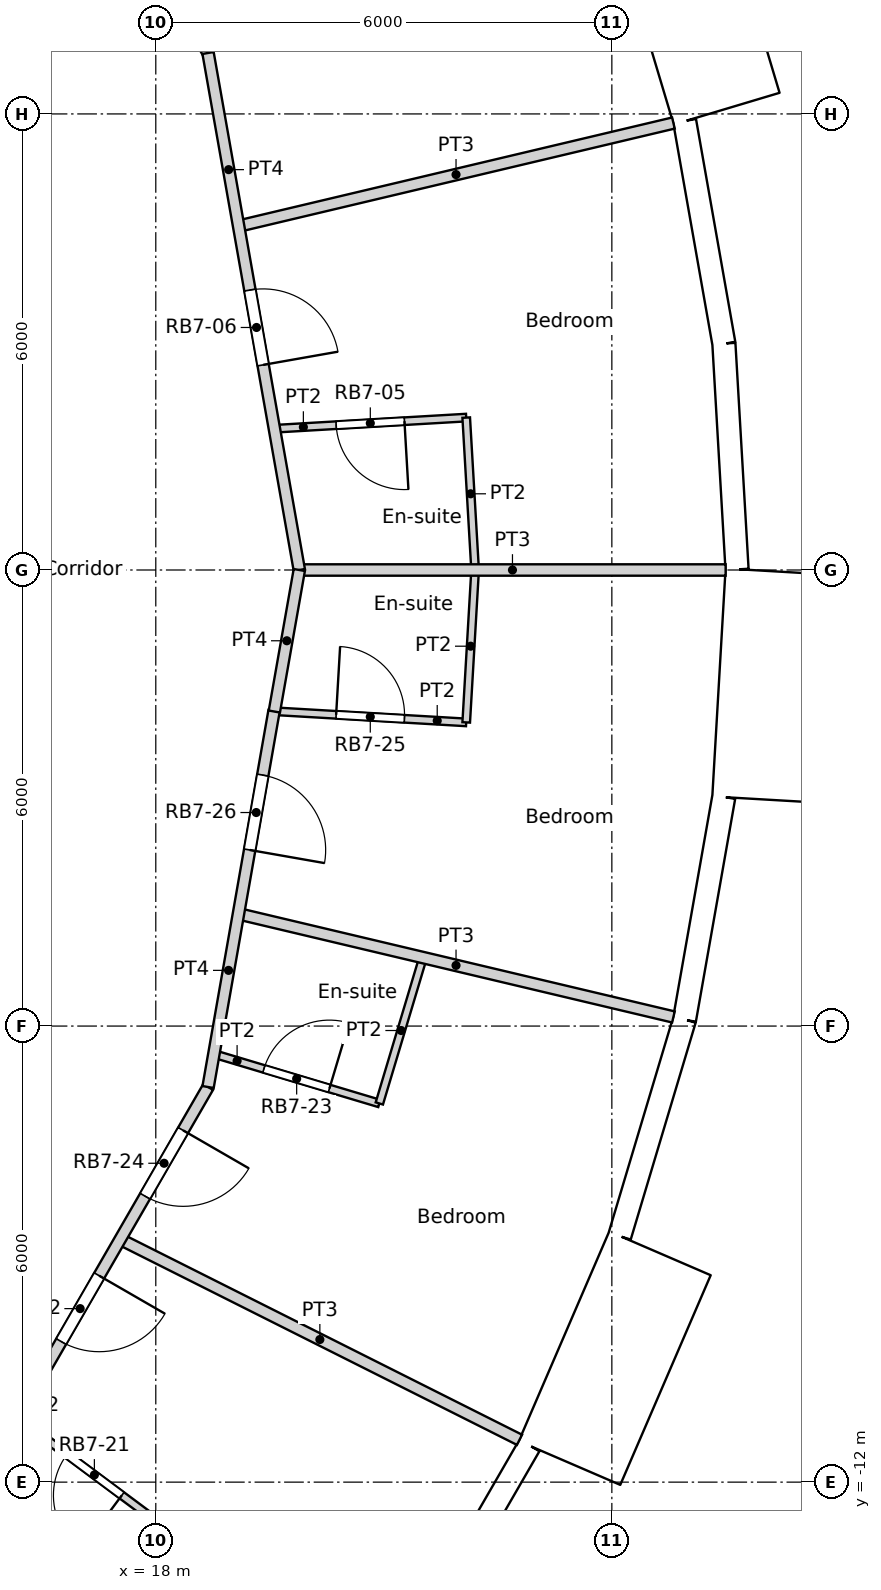
"""IFC4 building model, lengths in metres.
Left out: names, types, materials, properties, quantities, classifications, styles, units other than length and angle.
Written with IfcOpenShell. Run it as: python <this file> out.ifc"""

import sys

from ifc_helpers import new_model, si_unit, direction, frame, frame_2d, origin, origin_2d, place, context, subcontext, project, spatial, rectangle, circle, extrude, element, fill, save


model = new_model("IFC4")
c1 = context("Model", 3, precision=1e-05, world=origin(), true_north=direction((0.0, 1.0)))
c2 = subcontext(c1, "Body", "Model", "MODEL_VIEW")
j1 = project(units=[si_unit("LENGTHUNIT", "METRE"), si_unit("PLANEANGLEUNIT", "RADIAN")], contexts=[c1])
p1 = place(None, origin())
s1 = spatial("IfcSite", under=j1, at=p1, CompositionType="ELEMENT")
p2 = place(p1, origin())
s2 = spatial("IfcBuilding", under=s1, at=p2, CompositionType="ELEMENT")
p3 = place(p2, frame((0.0, 0.0, 190.8)))
s3 = spatial("IfcBuildingStorey", under=s2, at=p3, CompositionType="ELEMENT", Elevation=190.8)
for number, where, z_axis, x_axis in (
    (1, (24.548, 0.0, 0.0), (0.0, 0.0, 1.0), (1.0, 0.0, 0.0)),
    (2, (23.886, 5.661, 0.0), (0.0, 0.0, 1.0), (1.0, 0.0, 0.0)),
    (3, (21.937, -11.017, 0.0), (0.0, 0.0, 1.0), (1.0, 0.0, 0.0)),
    (4, (23.886, -5.661, 0.0), (0.0, 0.0, 1.0), (1.0, 0.0, 0.0)),
):
    element("IfcColumn", number, at=place(p3, frame(where, z_axis=z_axis, x_axis=x_axis)), inside=s3, PredefinedType="COLUMN", context=c2, shape_type="SweptSolid", body=[
        extrude(circle(Radius=0.6, at=origin_2d()), origin(), (0.0, 0.0, 1.0), 3.6),
    ])
for number, where, z_axis, x_axis in (
    (5, (18.822, 0.0, 0.0), (0.0, 0.0, 1.0), (1.0, 0.0, 0.0)),
    (6, (17.986, 5.548, 0.0), (0.0, 0.0, 1.0), (1.0, 0.0, 0.0)),
    (7, (17.986, -5.548, 0.0), (0.0, 0.0, 1.0), (1.0, 0.0, 0.0)),
):
    element("IfcColumn", number, at=place(p3, frame(where, z_axis=z_axis, x_axis=x_axis)), inside=s3, PredefinedType="COLUMN", context=c2, shape_type="SweptSolid", body=[
        extrude(circle(Radius=0.65, at=origin_2d()), origin(), (0.0, 0.0, 1.0), 3.6),
    ])
p4 = place(p3, frame((25.647, 0.01, 0.0), z_axis=(0.0, 0.0, 1.0), x_axis=(-0.058139540521, 0.998308466271, 0.0)))
e8 = element("IfcWall", 8, at=p4, inside=s3, PredefinedType="SOLIDWALL", context=c2, shape_type="SweptSolid", body=[
    extrude(rectangle(XDim=2.973, YDim=0.3, at=frame_2d((1.487, 0.0))), origin(), (0.0, 0.0, 1.0), 2.8),
])
p5 = place(p4, frame((1.486, 0.0, 1.55)))
e9 = element("IfcOpeningElement", 9, at=p5, cuts=e8, PredefinedType="OPENING", context=c2, shape_type="SweptSolid", body=[
    extrude(circle(Radius=0.9, at=origin_2d()), frame((0.0, 0.16, 0.0), z_axis=(0.0, -1.0, 0.0), x_axis=(1.0, 0.0, 0.0)), (0.0, 0.0, 1.0), 0.32),
])
p6 = place(p3, frame((25.474, 2.978, 0.0), z_axis=(0.0, 0.0, 1.0), x_axis=(-0.173686952598, 0.984800915159, 0.0)))
e10 = element("IfcWall", 10, at=p6, inside=s3, PredefinedType="SOLIDWALL", context=c2, shape_type="SweptSolid", body=[
    extrude(rectangle(XDim=2.973, YDim=0.3, at=frame_2d((1.486, 0.0))), origin(), (0.0, 0.0, 1.0), 3.3),
])
p7 = place(p6, frame((1.486, 0.0, 1.55)))
e11 = element("IfcOpeningElement", 11, at=p7, cuts=e10, PredefinedType="OPENING", context=c2, shape_type="SweptSolid", body=[
    extrude(circle(Radius=0.9, at=origin_2d()), frame((0.0, 0.16, 0.0), z_axis=(0.0, -1.0, 0.0), x_axis=(1.0, 0.0, 0.0)), (0.0, 0.0, 1.0), 0.32),
])
p8 = place(p3, frame((25.51, 6.071, -0.3), z_axis=(0.0, 0.0, 1.0), x_axis=(-0.286780420304, 0.957996341606, 0.0)))
e12 = element("IfcWall", 12, at=p8, inside=s3, PredefinedType="ELEMENTEDWALL", context=c2, shape_type="SweptSolid", body=[
    extrude(rectangle(XDim=3.0, YDim=1.45, at=frame_2d((1.5, 0.0))), origin(), (0.0, 0.0, 1.0), 3.6),
])
p9 = place(p8, frame((1.5, 0.0, 1.85)))
e13 = element("IfcOpeningElement", 13, at=p9, cuts=e12, PredefinedType="OPENING", context=c2, shape_type="SweptSolid", body=[
    extrude(circle(Radius=0.9, at=origin_2d()), frame((0.0, 0.735, 0.0), z_axis=(0.0, -1.0, 0.0), x_axis=(1.0, 0.0, 0.0)), (0.0, 0.0, 1.0), 1.47),
])
p10 = place(p3, frame((21.428, -14.094, 0.0), z_axis=(0.0, 0.0, 1.0), x_axis=(0.499954672104, 0.866051572276, 0.0)))
e14 = element("IfcWall", 14, at=p10, inside=s3, PredefinedType="SOLIDWALL", context=c2, shape_type="SweptSolid", body=[
    extrude(rectangle(XDim=2.973, YDim=0.3, at=frame_2d((1.486, 0.0))), origin(), (0.0, 0.0, 1.0), 3.3),
])
p11 = place(p10, frame((1.486, 0.0, 1.55)))
e15 = element("IfcOpeningElement", 15, at=p11, cuts=e14, PredefinedType="OPENING", context=c2, shape_type="SweptSolid", body=[
    extrude(circle(Radius=0.9, at=origin_2d()), frame((0.0, 0.16, 0.0), z_axis=(0.0, -1.0, 0.0), x_axis=(1.0, 0.0, 0.0)), (0.0, 0.0, 1.0), 0.32),
])
p12 = place(p3, frame((23.444, -11.746, -0.3), z_axis=(0.0, 0.0, 1.0), x_axis=(0.396079003245, 0.918216435917, 0.0)))
e16 = element("IfcWall", 16, at=p12, inside=s3, PredefinedType="ELEMENTEDWALL", context=c2, shape_type="SweptSolid", body=[
    extrude(rectangle(XDim=3.0, YDim=1.45, at=frame_2d((1.5, 0.0))), origin(), (0.0, 0.0, 1.0), 3.6),
])
p13 = place(p12, frame((1.5, 0.0, 1.85)))
e17 = element("IfcOpeningElement", 17, at=p13, cuts=e16, PredefinedType="OPENING", context=c2, shape_type="SweptSolid", body=[
    extrude(circle(Radius=0.9, at=origin_2d()), frame((0.0, 0.735, 0.0), z_axis=(0.0, -1.0, 0.0), x_axis=(1.0, 0.0, 0.0)), (0.0, 0.0, 1.0), 1.47),
])
p14 = place(p3, frame((24.104, -8.763, 0.0), z_axis=(0.0, 0.0, 1.0), x_axis=(0.286782750849, 0.957995643944, 0.0)))
e18 = element("IfcWall", 18, at=p14, inside=s3, PredefinedType="SOLIDWALL", context=c2, shape_type="SweptSolid", body=[
    extrude(rectangle(XDim=2.973, YDim=0.3, at=frame_2d((1.486, 0.0))), origin(), (0.0, 0.0, 1.0), 2.8),
])
p15 = place(p14, frame((1.486, 0.0, 1.55)))
e19 = element("IfcOpeningElement", 19, at=p15, cuts=e18, PredefinedType="OPENING", context=c2, shape_type="SweptSolid", body=[
    extrude(circle(Radius=0.9, at=origin_2d()), frame((0.0, 0.16, 0.0), z_axis=(0.0, -1.0, 0.0), x_axis=(1.0, 0.0, 0.0)), (0.0, 0.0, 1.0), 0.32),
])
p16 = place(p3, frame((24.956, -5.915, 0.0), z_axis=(0.0, 0.0, 1.0), x_axis=(0.173686952598, 0.984800915159, 0.0)))
e20 = element("IfcWall", 20, at=p16, inside=s3, PredefinedType="SOLIDWALL", context=c2, shape_type="SweptSolid", body=[
    extrude(rectangle(XDim=2.973, YDim=0.3, at=frame_2d((1.486, 0.0))), origin(), (0.0, 0.0, 1.0), 3.3),
])
p17 = place(p16, frame((1.486, 0.0, 1.55)))
e21 = element("IfcOpeningElement", 21, at=p17, cuts=e20, PredefinedType="OPENING", context=c2, shape_type="SweptSolid", body=[
    extrude(circle(Radius=0.9, at=origin_2d()), frame((0.0, 0.16, 0.0), z_axis=(0.0, -1.0, 0.0), x_axis=(1.0, 0.0, 0.0)), (0.0, 0.0, 1.0), 0.32),
])
p18 = place(p3, frame((26.048, -3.02, -0.3), z_axis=(0.0, 0.0, 1.0), x_axis=(0.058106596105, 0.998310384344, 0.0)))
e22 = element("IfcWall", 22, at=p18, inside=s3, PredefinedType="ELEMENTEDWALL", context=c2, shape_type="SweptSolid", body=[
    extrude(rectangle(XDim=3.0, YDim=1.45, at=frame_2d((1.5, 0.0))), origin(), (0.0, 0.0, 1.0), 3.6),
])
p19 = place(p18, frame((1.5, 0.0, 1.85)))
e23 = element("IfcOpeningElement", 23, at=p19, cuts=e22, PredefinedType="OPENING", context=c2, shape_type="SweptSolid", body=[
    extrude(circle(Radius=0.9, at=origin_2d()), frame((0.0, 0.735, 0.0), z_axis=(0.0, -1.0, 0.0), x_axis=(1.0, 0.0, 0.0)), (0.0, 0.0, 1.0), 1.47),
])
p20 = place(p3, frame((18.688, 6.802, 0.0), z_axis=(0.0, 0.0, 1.0), x_axis=(0.173831710537, -0.984775373581, 0.0)))
e24 = element("IfcWall", 24, at=p20, inside=s3, PredefinedType="PARTITIONING", context=c2, shape_type="SweptSolid", body=[
    extrude(rectangle(XDim=6.907, YDim=0.15, at=frame_2d((3.454, 0.0))), origin(), (0.0, 0.0, 1.0), 3.3),
])
p21 = place(p20, frame((3.167, 0.0, 0.0)))
e25 = element("IfcOpeningElement", 25, at=p21, cuts=e24, PredefinedType="OPENING", context=c2, shape_type="SweptSolid", body=[
    extrude(rectangle(XDim=1.0, YDim=2.1, at=frame_2d((0.5, 1.05))), frame((0.0, 0.075, 0.0), z_axis=(0.0, -1.0, 0.0), x_axis=(1.0, 0.0, 0.0)), (0.0, 0.0, 1.0), 0.15),
])
p22 = place(p3, frame((15.235, 12.784, 0.0), z_axis=(0.0, 0.0, 1.0), x_axis=(0.499914202267, -0.866074933462, 0.0)))
e26 = element("IfcWall", 26, at=p22, inside=s3, PredefinedType="PARTITIONING", context=c2, shape_type="SweptSolid", body=[
    extrude(rectangle(XDim=6.907, YDim=0.15, at=frame_2d((3.454, 0.0))), origin(), (0.0, 0.0, 1.0), 3.3),
])
p23 = place(p22, frame((3.004, 0.0, 0.0)))
e27 = element("IfcOpeningElement", 27, at=p23, cuts=e26, PredefinedType="OPENING", context=c2, shape_type="SweptSolid", body=[
    extrude(rectangle(XDim=1.8, YDim=2.1, at=frame_2d((0.9, 1.05))), frame((0.0, 0.075, 0.0), z_axis=(0.0, -1.0, 0.0), x_axis=(1.0, 0.0, 0.0)), (0.0, 0.0, 1.0), 0.15),
])
p24 = place(p3, frame((15.235, -12.784, 0.0), z_axis=(0.0, 0.0, 1.0), x_axis=(0.499982531118, 0.866035489213, 0.0)))
e28 = element("IfcWall", 28, at=p24, inside=s3, PredefinedType="PARTITIONING", context=c2, shape_type="SweptSolid", body=[
    extrude(rectangle(XDim=6.907, YDim=0.15, at=frame_2d((3.454, 0.0))), origin(), (0.0, 0.0, 1.0), 3.3),
])
p25 = place(p24, frame((3.041, 0.0, 0.0)))
e29 = element("IfcOpeningElement", 29, at=p25, cuts=e28, PredefinedType="OPENING", context=c2, shape_type="SweptSolid", body=[
    extrude(rectangle(XDim=1.0, YDim=2.1, at=frame_2d((0.5, 1.05))), frame((0.0, 0.075, 0.0), z_axis=(0.0, -1.0, 0.0), x_axis=(1.0, 0.0, 0.0)), (0.0, 0.0, 1.0), 0.15),
])
p26 = place(p24, frame((5.249, 0.0, 0.0)))
e30 = element("IfcOpeningElement", 30, at=p26, cuts=e28, PredefinedType="OPENING", context=c2, shape_type="SweptSolid", body=[
    extrude(rectangle(XDim=1.0, YDim=2.1, at=frame_2d((0.5, 1.05))), frame((0.0, 0.075, 0.0), z_axis=(0.0, -1.0, 0.0), x_axis=(1.0, 0.0, 0.0)), (0.0, 0.0, 1.0), 0.15),
])
p27 = place(p3, frame((18.688, -6.802, 0.0), z_axis=(0.0, 0.0, 1.0), x_axis=(0.172737452508, 0.9849679043, 0.0)))
e31 = element("IfcWall", 31, at=p27, inside=s3, PredefinedType="PARTITIONING", context=c2, shape_type="SweptSolid", body=[
    extrude(rectangle(XDim=5.024, YDim=0.15, at=frame_2d((2.512, 0.0))), origin(), (0.0, 0.0, 1.0), 3.3),
])
p28 = place(p27, frame((3.167, 0.0, 0.0)))
e32 = element("IfcOpeningElement", 32, at=p28, cuts=e31, PredefinedType="OPENING", context=c2, shape_type="SweptSolid", body=[
    extrude(rectangle(XDim=1.0, YDim=2.1, at=frame_2d((0.5, 1.05))), frame((0.0, 0.075, 0.0), z_axis=(0.0, -1.0, 0.0), x_axis=(1.0, 0.0, 0.0)), (0.0, 0.0, 1.0), 0.15),
])
p29 = place(p3, frame((19.56, -1.862, 0.0), z_axis=(0.0, 0.0, 1.0), x_axis=(0.173417007661, 0.984848486547, 0.0)))
e33 = element("IfcWall", 33, at=p29, inside=s3, PredefinedType="PARTITIONING", context=c2, shape_type="SweptSolid", body=[
    extrude(rectangle(XDim=1.891, YDim=0.15, at=frame_2d((0.945, 0.0))), origin(), (0.0, 0.0, 1.0), 3.3),
])
p30 = place(p3, frame((22.084, 2.005, 0.0), z_axis=(0.0, 0.0, 1.0), x_axis=(0.058230299749, -0.998303176491, 0.0)))
e34 = element("IfcWall", 34, at=p30, inside=s3, PredefinedType="PARTITIONING", context=c2, shape_type="SweptSolid", body=[
    extrude(rectangle(XDim=2.008, YDim=0.1, at=frame_2d((1.004, 0.0))), origin(), (0.0, 0.0, 1.0), 3.3),
])
p31 = place(p3, frame((19.56, 1.858, 0.0), z_axis=(0.0, 0.0, 1.0), x_axis=(0.998308830473, 0.05813328651, 0.0)))
e35 = element("IfcWall", 35, at=p31, inside=s3, PredefinedType="PARTITIONING", context=c2, shape_type="SweptSolid", body=[
    extrude(rectangle(XDim=2.528, YDim=0.1, at=frame_2d((1.264, 0.0))), origin(), (0.0, 0.0, 1.0), 3.3),
])
p32 = place(p31, frame((0.814, 0.0, 0.0)))
e36 = element("IfcOpeningElement", 36, at=p32, cuts=e35, PredefinedType="OPENING", context=c2, shape_type="SweptSolid", body=[
    extrude(rectangle(XDim=0.9, YDim=2.04, at=frame_2d((0.45, 1.02))), frame((0.0, 0.05, 0.0), z_axis=(0.0, -1.0, 0.0), x_axis=(1.0, 0.0, 0.0)), (0.0, 0.0, 1.0), 0.1),
])
p33 = place(p3, frame((19.09, 4.524, 0.0), z_axis=(0.0, 0.0, 1.0), x_axis=(0.973033452951, 0.230664040193, 0.0)))
e37 = element("IfcWall", 37, at=p33, inside=s3, PredefinedType="PARTITIONING", context=c2, shape_type="SweptSolid", body=[
    extrude(rectangle(XDim=5.878, YDim=0.15, at=frame_2d((2.939, 0.0))), origin(), (0.0, 0.0, 1.0), 3.3),
])
p34 = place(p3, frame((19.888, 0.0, 0.0), z_axis=(0.0, 0.0, 1.0), x_axis=(1.0, 0.0, 0.0)))
e38 = element("IfcWall", 38, at=p34, inside=s3, PredefinedType="PARTITIONING", context=c2, shape_type="SweptSolid", body=[
    extrude(rectangle(XDim=5.609, YDim=0.15, at=frame_2d((2.805, 0.0))), origin(), (0.0, 0.0, 1.0), 3.3),
])
p35 = place(p3, frame((16.178, -11.15, 0.0), z_axis=(0.0, 0.0, 1.0), x_axis=(0.8020923136, -0.597200067367, 0.0)))
e39 = element("IfcWall", 39, at=p35, inside=s3, PredefinedType="PARTITIONING", context=c2, shape_type="SweptSolid", body=[
    extrude(rectangle(XDim=2.529, YDim=0.1, at=frame_2d((1.264, 0.0))), origin(), (0.0, 0.0, 1.0), 3.3),
])
p36 = place(p35, frame((0.814, 0.0, 0.0)))
e40 = element("IfcOpeningElement", 40, at=p36, cuts=e39, PredefinedType="OPENING", context=c2, shape_type="SweptSolid", body=[
    extrude(rectangle(XDim=0.9, YDim=2.04, at=frame_2d((0.45, 1.02))), frame((0.0, 0.05, 0.0), z_axis=(0.0, -1.0, 0.0), x_axis=(1.0, 0.0, 0.0)), (0.0, 0.0, 1.0), 0.1),
])
p37 = place(p3, frame((17.532, -8.805, 0.0), z_axis=(0.0, 0.0, 1.0), x_axis=(0.893628331628, -0.448807759415, 0.0)))
e41 = element("IfcWall", 41, at=p37, inside=s3, PredefinedType="PARTITIONING", context=c2, shape_type="SweptSolid", body=[
    extrude(rectangle(XDim=5.878, YDim=0.15, at=frame_2d((2.939, 0.0))), origin(), (0.0, 0.0, 1.0), 3.3),
])
p38 = place(p3, frame((18.765, -6.367, 0.0), z_axis=(0.0, 0.0, 1.0), x_axis=(0.958030169919, -0.286667391807, 0.0)))
e42 = element("IfcWall", 42, at=p38, inside=s3, PredefinedType="PARTITIONING", context=c2, shape_type="SweptSolid", body=[
    extrude(rectangle(XDim=2.271, YDim=0.1, at=frame_2d((1.136, 0.0))), origin(), (0.0, 0.0, 1.0), 3.3),
])
p39 = place(p38, frame((0.686, 0.0, 0.0)))
e43 = element("IfcOpeningElement", 43, at=p39, cuts=e42, PredefinedType="OPENING", context=c2, shape_type="SweptSolid", body=[
    extrude(rectangle(XDim=0.9, YDim=2.04, at=frame_2d((0.45, 1.02))), frame((0.0, 0.05, 0.0), z_axis=(0.0, -1.0, 0.0), x_axis=(1.0, 0.0, 0.0)), (0.0, 0.0, 1.0), 0.1),
])
p40 = place(p3, frame((20.941, -7.018, 0.0), z_axis=(0.0, 0.0, 1.0), x_axis=(0.287124264191, 0.957893343182, 0.0)))
e44 = element("IfcWall", 44, at=p40, inside=s3, PredefinedType="PARTITIONING", context=c2, shape_type="SweptSolid", body=[
    extrude(rectangle(XDim=2.003, YDim=0.1, at=frame_2d((1.002, 0.0))), origin(), (0.0, 0.0, 1.0), 3.3),
])
p41 = place(p3, frame((19.09, -4.524, 0.0), z_axis=(0.0, 0.0, 1.0), x_axis=(0.973024130834, -0.230703361082, 0.0)))
e45 = element("IfcWall", 45, at=p41, inside=s3, PredefinedType="PARTITIONING", context=c2, shape_type="SweptSolid", body=[
    extrude(rectangle(XDim=5.879, YDim=0.15, at=frame_2d((2.939, 0.0))), origin(), (0.0, 0.0, 1.0), 3.3),
])
p42 = place(p3, frame((19.56, -1.858, 0.0), z_axis=(0.0, 0.0, 1.0), x_axis=(0.998308830473, -0.05813328651, 0.0)))
e46 = element("IfcWall", 46, at=p42, inside=s3, PredefinedType="PARTITIONING", context=c2, shape_type="SweptSolid", body=[
    extrude(rectangle(XDim=2.528, YDim=0.1, at=frame_2d((1.264, 0.0))), origin(), (0.0, 0.0, 1.0), 3.3),
])
p43 = place(p42, frame((0.814, 0.0, 0.0)))
e47 = element("IfcOpeningElement", 47, at=p43, cuts=e46, PredefinedType="OPENING", context=c2, shape_type="SweptSolid", body=[
    extrude(rectangle(XDim=0.9, YDim=2.04, at=frame_2d((0.45, 1.02))), frame((0.0, 0.05, 0.0), z_axis=(0.0, -1.0, 0.0), x_axis=(1.0, 0.0, 0.0)), (0.0, 0.0, 1.0), 0.1),
])
p44 = place(p3, frame((22.084, -2.005, 0.0), z_axis=(0.0, 0.0, 1.0), x_axis=(0.058230299749, 0.998303176491, 0.0)))
e48 = element("IfcWall", 48, at=p44, inside=s3, PredefinedType="PARTITIONING", context=c2, shape_type="SweptSolid", body=[
    extrude(rectangle(XDim=2.008, YDim=0.1, at=frame_2d((1.004, 0.0))), origin(), (0.0, 0.0, 1.0), 3.3),
])
p45 = place(p5, origin())
e49 = element("IfcWindow", 49, at=p45, inside=s3, PartitioningType="SINGLE_PANEL", PredefinedType="WINDOW", context=c2, shape_type="SweptSolid", body=[
    extrude(circle(Radius=0.9, at=origin_2d()), frame((0.0, 0.12, 0.0), z_axis=(0.0, -1.0, 0.0), x_axis=(1.0, 0.0, 0.0)), (0.0, 0.0, 1.0), 0.1),
])
fill(e9, e49)
p46 = place(p7, origin())
e50 = element("IfcWindow", 50, at=p46, inside=s3, PartitioningType="SINGLE_PANEL", PredefinedType="WINDOW", context=c2, shape_type="SweptSolid", body=[
    extrude(circle(Radius=0.9, at=origin_2d()), frame((0.0, 0.12, 0.0), z_axis=(0.0, -1.0, 0.0), x_axis=(1.0, 0.0, 0.0)), (0.0, 0.0, 1.0), 0.1),
])
fill(e11, e50)
p47 = place(p9, origin())
e51 = element("IfcWindow", 51, at=p47, inside=s3, PartitioningType="SINGLE_PANEL", PredefinedType="WINDOW", context=c2, shape_type="SweptSolid", body=[
    extrude(circle(Radius=0.9, at=origin_2d()), frame((0.0, 0.695, 0.0), z_axis=(0.0, -1.0, 0.0), x_axis=(1.0, 0.0, 0.0)), (0.0, 0.0, 1.0), 0.1),
])
fill(e13, e51)
p48 = place(p11, origin())
e52 = element("IfcWindow", 52, at=p48, inside=s3, PartitioningType="SINGLE_PANEL", PredefinedType="WINDOW", context=c2, shape_type="SweptSolid", body=[
    extrude(circle(Radius=0.9, at=origin_2d()), frame((0.0, 0.12, 0.0), z_axis=(0.0, -1.0, 0.0), x_axis=(1.0, 0.0, 0.0)), (0.0, 0.0, 1.0), 0.1),
])
fill(e15, e52)
p49 = place(p13, origin())
e53 = element("IfcWindow", 53, at=p49, inside=s3, PartitioningType="SINGLE_PANEL", PredefinedType="WINDOW", context=c2, shape_type="SweptSolid", body=[
    extrude(circle(Radius=0.9, at=origin_2d()), frame((0.0, 0.695, 0.0), z_axis=(0.0, -1.0, 0.0), x_axis=(1.0, 0.0, 0.0)), (0.0, 0.0, 1.0), 0.1),
])
fill(e17, e53)
p50 = place(p15, origin())
e54 = element("IfcWindow", 54, at=p50, inside=s3, PartitioningType="SINGLE_PANEL", PredefinedType="WINDOW", context=c2, shape_type="SweptSolid", body=[
    extrude(circle(Radius=0.9, at=origin_2d()), frame((0.0, 0.12, 0.0), z_axis=(0.0, -1.0, 0.0), x_axis=(1.0, 0.0, 0.0)), (0.0, 0.0, 1.0), 0.1),
])
fill(e19, e54)
p51 = place(p17, origin())
e55 = element("IfcWindow", 55, at=p51, inside=s3, PartitioningType="SINGLE_PANEL", PredefinedType="WINDOW", context=c2, shape_type="SweptSolid", body=[
    extrude(circle(Radius=0.9, at=origin_2d()), frame((0.0, 0.12, 0.0), z_axis=(0.0, -1.0, 0.0), x_axis=(1.0, 0.0, 0.0)), (0.0, 0.0, 1.0), 0.1),
])
fill(e21, e55)
p52 = place(p19, origin())
e56 = element("IfcWindow", 56, at=p52, inside=s3, PartitioningType="SINGLE_PANEL", PredefinedType="WINDOW", context=c2, shape_type="SweptSolid", body=[
    extrude(circle(Radius=0.9, at=origin_2d()), frame((0.0, 0.695, 0.0), z_axis=(0.0, -1.0, 0.0), x_axis=(1.0, 0.0, 0.0)), (0.0, 0.0, 1.0), 0.1),
])
fill(e23, e56)
p53 = place(p32, origin())
e57 = element("IfcDoor", 57, at=p53, inside=s3, OperationType="SINGLE_SWING_LEFT", PredefinedType="DOOR", context=c2, shape_type="SweptSolid", body=[
    extrude(rectangle(XDim=0.9, YDim=2.04, at=frame_2d((0.45, 1.02))), frame((0.0, 0.025, 0.0), z_axis=(0.0, -1.0, 0.0), x_axis=(1.0, 0.0, 0.0)), (0.0, 0.0, 1.0), 0.05),
])
fill(e36, e57)
p54 = place(p21, origin())
e58 = element("IfcDoor", 58, at=p54, inside=s3, OperationType="SINGLE_SWING_RIGHT", PredefinedType="DOOR", context=c2, shape_type="SweptSolid", body=[
    extrude(rectangle(XDim=1.0, YDim=2.1, at=frame_2d((0.5, 1.05))), frame((0.0, 0.025, 0.0), z_axis=(0.0, -1.0, 0.0), x_axis=(1.0, 0.0, 0.0)), (0.0, 0.0, 1.0), 0.05),
])
fill(e25, e58)
p55 = place(p36, origin())
e59 = element("IfcDoor", 59, at=p55, inside=s3, OperationType="SINGLE_SWING_LEFT", PredefinedType="DOOR", context=c2, shape_type="SweptSolid", body=[
    extrude(rectangle(XDim=0.9, YDim=2.04, at=frame_2d((0.45, 1.02))), frame((0.0, 0.025, 0.0), z_axis=(0.0, -1.0, 0.0), x_axis=(1.0, 0.0, 0.0)), (0.0, 0.0, 1.0), 0.05),
])
fill(e40, e59)
p56 = place(p25, origin())
e60 = element("IfcDoor", 60, at=p56, inside=s3, OperationType="SINGLE_SWING_LEFT", PredefinedType="DOOR", context=c2, shape_type="SweptSolid", body=[
    extrude(rectangle(XDim=1.0, YDim=2.1, at=frame_2d((0.5, 1.05))), frame((0.0, 0.025, 0.0), z_axis=(0.0, -1.0, 0.0), x_axis=(1.0, 0.0, 0.0)), (0.0, 0.0, 1.0), 0.05),
])
fill(e29, e60)
p57 = place(p39, origin())
e61 = element("IfcDoor", 61, at=p57, inside=s3, OperationType="SINGLE_SWING_RIGHT", PredefinedType="DOOR", context=c2, shape_type="SweptSolid", body=[
    extrude(rectangle(XDim=0.9, YDim=2.04, at=frame_2d((0.45, 1.02))), frame((0.0, 0.025, 0.0), z_axis=(0.0, -1.0, 0.0), x_axis=(1.0, 0.0, 0.0)), (0.0, 0.0, 1.0), 0.05),
])
fill(e43, e61)
p58 = place(p26, origin())
e62 = element("IfcDoor", 62, at=p58, inside=s3, OperationType="SINGLE_SWING_LEFT", PredefinedType="DOOR", context=c2, shape_type="SweptSolid", body=[
    extrude(rectangle(XDim=1.0, YDim=2.1, at=frame_2d((0.5, 1.05))), frame((0.0, 0.025, 0.0), z_axis=(0.0, -1.0, 0.0), x_axis=(1.0, 0.0, 0.0)), (0.0, 0.0, 1.0), 0.05),
])
fill(e30, e62)
p59 = place(p43, origin())
e63 = element("IfcDoor", 63, at=p59, inside=s3, OperationType="SINGLE_SWING_LEFT", PredefinedType="DOOR", context=c2, shape_type="SweptSolid", body=[
    extrude(rectangle(XDim=0.9, YDim=2.04, at=frame_2d((0.45, 1.02))), frame((0.0, 0.025, 0.0), z_axis=(0.0, -1.0, 0.0), x_axis=(1.0, 0.0, 0.0)), (0.0, 0.0, 1.0), 0.05),
])
fill(e47, e63)
p60 = place(p28, origin())
e64 = element("IfcDoor", 64, at=p60, inside=s3, OperationType="SINGLE_SWING_RIGHT", PredefinedType="DOOR", context=c2, shape_type="SweptSolid", body=[
    extrude(rectangle(XDim=1.0, YDim=2.1, at=frame_2d((0.5, 1.05))), frame((0.0, 0.025, 0.0), z_axis=(0.0, -1.0, 0.0), x_axis=(1.0, 0.0, 0.0)), (0.0, 0.0, 1.0), 0.05),
])
fill(e32, e64)
save(model, sys.argv[1])
